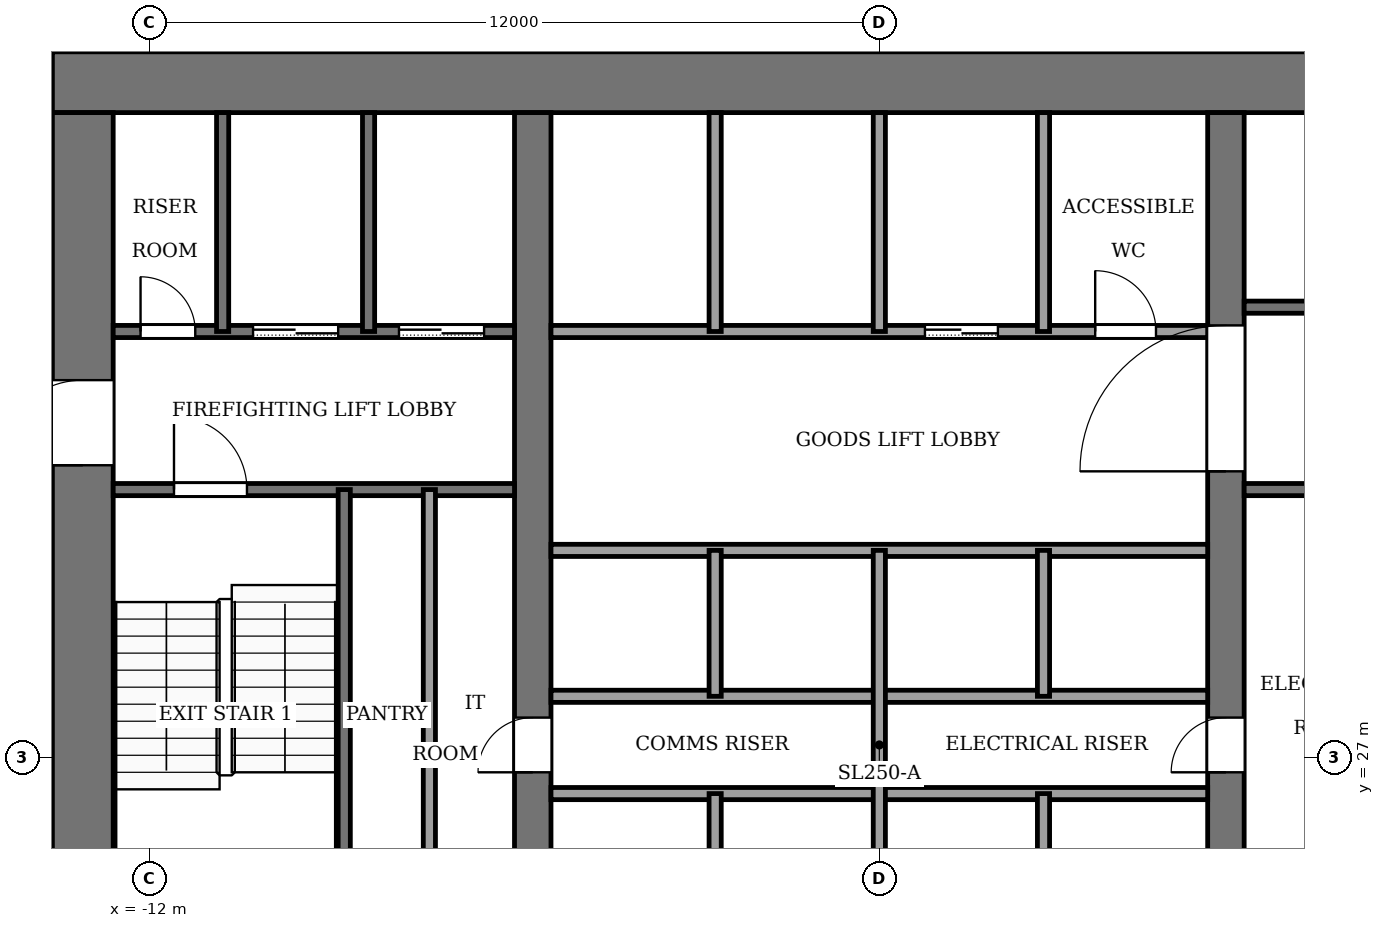
"""IFC4 building model, lengths in metres.
Left out: names, types, materials, properties, quantities, classifications, styles, units other than length and angle.
Written with IfcOpenShell. Run it as: python <this file> out.ifc"""

import sys

from ifc_helpers import new_model, si_unit, direction, frame, frame_2d, origin, place, context, subcontext, project, spatial, rectangle, extrude, element, fill, save


model = new_model("IFC4")
c1 = context("Model", 3, precision=1e-05, world=origin(), true_north=direction((0.0, 1.0)))
c2 = subcontext(c1, "Body", "Model", "MODEL_VIEW")
j1 = project(units=[si_unit("LENGTHUNIT", "METRE"), si_unit("PLANEANGLEUNIT", "RADIAN")], contexts=[c1])
p1 = place(None, origin())
s1 = spatial("IfcSite", under=j1, at=p1, CompositionType="ELEMENT")
p2 = place(p1, origin())
s2 = spatial("IfcBuilding", under=s1, at=p2, CompositionType="ELEMENT")
p3 = place(p2, frame((0.0, 0.0, 166.0)))
s3 = spatial("IfcBuildingStorey", under=s2, at=p3, CompositionType="ELEMENT", Elevation=166.0)
p4 = place(p3, frame((-13.6, 38.1, -0.13), z_axis=(0.0, 0.0, 1.0), x_axis=(1.0, 0.0, 0.0)))
e1 = element("IfcWall", 1, at=p4, inside=s3, PredefinedType="SHEAR", context=c2, shape_type="SweptSolid", body=[
    extrude(rectangle(XDim=27.2, YDim=1.0, at=frame_2d((13.6, 0.0))), origin(), (0.0, 0.0, 1.0), 3.88),
])
p5 = place(p3, frame((-13.1, 18.4, -0.13), z_axis=(0.0, 0.0, 1.0), x_axis=(0.0, 1.0, 0.0)))
e2 = element("IfcWall", 2, at=p5, inside=s3, PredefinedType="SHEAR", context=c2, shape_type="SweptSolid", body=[
    extrude(rectangle(XDim=19.2, YDim=1.0, at=frame_2d((9.6, 0.0))), origin(), (0.0, 0.0, 1.0), 3.88),
])
p6 = place(p5, frame((2.8, 0.0, 0.13)))
e3 = element("IfcOpeningElement", 3, at=p6, cuts=e2, PredefinedType="OPENING", context=c2, shape_type="SweptSolid", body=[
    extrude(rectangle(XDim=2.4, YDim=2.4, at=frame_2d((1.2, 1.2))), frame((0.0, 0.51, 0.0), z_axis=(0.0, -1.0, 0.0), x_axis=(1.0, 0.0, 0.0)), (0.0, 0.0, 1.0), 1.02),
])
p7 = place(p5, frame((13.4, 0.0, 0.13)))
e4 = element("IfcOpeningElement", 4, at=p7, cuts=e2, PredefinedType="OPENING", context=c2, shape_type="SweptSolid", body=[
    extrude(rectangle(XDim=1.4, YDim=2.2, at=frame_2d((0.7, 1.1))), frame((0.0, 0.51, 0.0), z_axis=(0.0, -1.0, 0.0), x_axis=(1.0, 0.0, 0.0)), (0.0, 0.0, 1.0), 1.02),
])
p8 = place(p3, frame((-5.7, 18.4, -0.13), z_axis=(0.0, 0.0, 1.0), x_axis=(0.0, 1.0, 0.0)))
e5 = element("IfcWall", 5, at=p8, inside=s3, PredefinedType="SHEAR", context=c2, shape_type="SweptSolid", body=[
    extrude(rectangle(XDim=19.2, YDim=0.6, at=frame_2d((9.6, 0.0))), origin(), (0.0, 0.0, 1.0), 3.88),
])
p9 = place(p8, frame((8.35, 0.0, 0.13)))
e6 = element("IfcOpeningElement", 6, at=p9, cuts=e5, PredefinedType="OPENING", context=c2, shape_type="SweptSolid", body=[
    extrude(rectangle(XDim=0.9, YDim=2.1, at=frame_2d((0.45, 1.05))), frame((0.0, 0.31, 0.0), z_axis=(0.0, -1.0, 0.0), x_axis=(1.0, 0.0, 0.0)), (0.0, 0.0, 1.0), 0.62),
])
p10 = place(p3, frame((5.7, 18.4, -0.13), z_axis=(0.0, 0.0, 1.0), x_axis=(0.0, 1.0, 0.0)))
e7 = element("IfcWall", 7, at=p10, inside=s3, PredefinedType="SHEAR", context=c2, shape_type="SweptSolid", body=[
    extrude(rectangle(XDim=19.2, YDim=0.6, at=frame_2d((9.6, 0.0))), origin(), (0.0, 0.0, 1.0), 3.88),
])
p11 = place(p10, frame((8.35, 0.0, 0.13)))
e8 = element("IfcOpeningElement", 8, at=p11, cuts=e7, PredefinedType="OPENING", context=c2, shape_type="SweptSolid", body=[
    extrude(rectangle(XDim=0.9, YDim=2.1, at=frame_2d((0.45, 1.05))), frame((0.0, 0.31, 0.0), z_axis=(0.0, -1.0, 0.0), x_axis=(1.0, 0.0, 0.0)), (0.0, 0.0, 1.0), 0.62),
])
p12 = place(p10, frame((13.3, 0.0, 0.13)))
e9 = element("IfcOpeningElement", 9, at=p12, cuts=e7, PredefinedType="OPENING", context=c2, shape_type="SweptSolid", body=[
    extrude(rectangle(XDim=2.4, YDim=2.4, at=frame_2d((1.2, 1.2))), frame((0.0, 0.31, 0.0), z_axis=(0.0, -1.0, 0.0), x_axis=(1.0, 0.0, 0.0)), (0.0, 0.0, 1.0), 0.62),
])
for number, where, z_axis, x_axis in (
    (10, (-5.4, 26.4, 0.0), (0.0, 0.0, 1.0), (1.0, 0.0, 0.0)),
    (11, (-5.4, 28.0, 0.0), (0.0, 0.0, 1.0), (1.0, 0.0, 0.0)),
    (12, (-5.4, 30.4, 0.0), (0.0, 0.0, 1.0), (1.0, 0.0, 0.0)),
):
    element("IfcWall", number, at=place(p3, frame(where, z_axis=z_axis, x_axis=x_axis)), inside=s3, PredefinedType="PARTITIONING", context=c2, shape_type="SweptSolid", body=[
        extrude(rectangle(XDim=10.8, YDim=0.2, at=frame_2d((5.4, 0.0))), origin(), (0.0, 0.0, 1.0), 3.75),
    ])
p13 = place(p3, frame((-12.6, 31.4, 0.0), z_axis=(0.0, 0.0, 1.0), x_axis=(1.0, 0.0, 0.0)))
e13 = element("IfcWall", 13, at=p13, inside=s3, PredefinedType="PARTITIONING", context=c2, shape_type="SweptSolid", body=[
    extrude(rectangle(XDim=6.6, YDim=0.2, at=frame_2d((3.3, 0.0))), origin(), (0.0, 0.0, 1.0), 3.75),
])
p14 = place(p13, frame((1.0, 0.0, 0.0)))
e14 = element("IfcOpeningElement", 14, at=p14, cuts=e13, PredefinedType="OPENING", context=c2, shape_type="SweptSolid", body=[
    extrude(rectangle(XDim=1.2, YDim=2.2, at=frame_2d((0.6, 1.1))), frame((0.0, 0.11, 0.0), z_axis=(0.0, -1.0, 0.0), x_axis=(1.0, 0.0, 0.0)), (0.0, 0.0, 1.0), 0.22),
])
p15 = place(p3, frame((6.0, 31.4, 0.0), z_axis=(0.0, 0.0, 1.0), x_axis=(1.0, 0.0, 0.0)))
e15 = element("IfcWall", 15, at=p15, inside=s3, PredefinedType="PARTITIONING", context=c2, shape_type="SweptSolid", body=[
    extrude(rectangle(XDim=6.6, YDim=0.2, at=frame_2d((3.3, 0.0))), origin(), (0.0, 0.0, 1.0), 3.75),
])
p16 = place(p3, frame((-12.6, 34.0, 0.0), z_axis=(0.0, 0.0, 1.0), x_axis=(1.0, 0.0, 0.0)))
e16 = element("IfcWall", 16, at=p16, inside=s3, PredefinedType="PARTITIONING", context=c2, shape_type="SweptSolid", body=[
    extrude(rectangle(XDim=6.6, YDim=0.2, at=frame_2d((3.3, 0.0))), origin(), (0.0, 0.0, 1.0), 3.75),
])
p17 = place(p16, frame((4.7, 0.0, 0.0)))
e17 = element("IfcOpeningElement", 17, at=p17, cuts=e16, PredefinedType="OPENING", context=c2, shape_type="SweptSolid", body=[
    extrude(rectangle(XDim=1.4, YDim=2.2, at=frame_2d((0.7, 1.1))), frame((0.0, 0.11, 0.0), z_axis=(0.0, -1.0, 0.0), x_axis=(1.0, 0.0, 0.0)), (0.0, 0.0, 1.0), 0.22),
])
p18 = place(p16, frame((2.3, 0.0, 0.0)))
e18 = element("IfcOpeningElement", 18, at=p18, cuts=e16, PredefinedType="OPENING", context=c2, shape_type="SweptSolid", body=[
    extrude(rectangle(XDim=1.4, YDim=2.2, at=frame_2d((0.7, 1.1))), frame((0.0, 0.11, 0.0), z_axis=(0.0, -1.0, 0.0), x_axis=(1.0, 0.0, 0.0)), (0.0, 0.0, 1.0), 0.22),
])
p19 = place(p16, frame((0.45, 0.0, 0.0)))
e19 = element("IfcOpeningElement", 19, at=p19, cuts=e16, PredefinedType="OPENING", context=c2, shape_type="SweptSolid", body=[
    extrude(rectangle(XDim=0.9, YDim=2.1, at=frame_2d((0.45, 1.05))), frame((0.0, 0.11, 0.0), z_axis=(0.0, -1.0, 0.0), x_axis=(1.0, 0.0, 0.0)), (0.0, 0.0, 1.0), 0.22),
])
p20 = place(p3, frame((-5.4, 34.0, 0.0), z_axis=(0.0, 0.0, 1.0), x_axis=(1.0, 0.0, 0.0)))
e20 = element("IfcWall", 20, at=p20, inside=s3, PredefinedType="PARTITIONING", context=c2, shape_type="SweptSolid", body=[
    extrude(rectangle(XDim=10.8, YDim=0.2, at=frame_2d((5.4, 0.0))), origin(), (0.0, 0.0, 1.0), 3.75),
])
p21 = place(p20, frame((6.15, 0.0, 0.0)))
e21 = element("IfcOpeningElement", 21, at=p21, cuts=e20, PredefinedType="OPENING", context=c2, shape_type="SweptSolid", body=[
    extrude(rectangle(XDim=1.2, YDim=2.2, at=frame_2d((0.6, 1.1))), frame((0.0, 0.11, 0.0), z_axis=(0.0, -1.0, 0.0), x_axis=(1.0, 0.0, 0.0)), (0.0, 0.0, 1.0), 0.22),
])
p22 = place(p20, frame((8.95, 0.0, 0.0)))
e22 = element("IfcOpeningElement", 22, at=p22, cuts=e20, PredefinedType="OPENING", context=c2, shape_type="SweptSolid", body=[
    extrude(rectangle(XDim=1.0, YDim=2.1, at=frame_2d((0.5, 1.05))), frame((0.0, 0.11, 0.0), z_axis=(0.0, -1.0, 0.0), x_axis=(1.0, 0.0, 0.0)), (0.0, 0.0, 1.0), 0.22),
])
p23 = place(p3, frame((6.0, 34.4, 0.0), z_axis=(0.0, 0.0, 1.0), x_axis=(1.0, 0.0, 0.0)))
e23 = element("IfcWall", 23, at=p23, inside=s3, PredefinedType="PARTITIONING", context=c2, shape_type="SweptSolid", body=[
    extrude(rectangle(XDim=6.6, YDim=0.2, at=frame_2d((3.3, 0.0))), origin(), (0.0, 0.0, 1.0), 3.75),
])
p24 = place(p23, frame((4.8, 0.0, 0.0)))
e24 = element("IfcOpeningElement", 24, at=p24, cuts=e23, PredefinedType="OPENING", context=c2, shape_type="SweptSolid", body=[
    extrude(rectangle(XDim=1.2, YDim=2.2, at=frame_2d((0.6, 1.1))), frame((0.0, 0.11, 0.0), z_axis=(0.0, -1.0, 0.0), x_axis=(1.0, 0.0, 0.0)), (0.0, 0.0, 1.0), 0.22),
])
p25 = place(p3, frame((-10.8, 34.0, 0.0), z_axis=(0.0, 0.0, 1.0), x_axis=(0.0, 1.0, 0.0)))
e25 = element("IfcWall", 25, at=p25, inside=s3, PredefinedType="PARTITIONING", context=c2, shape_type="SweptSolid", body=[
    extrude(rectangle(XDim=3.6, YDim=0.2, at=frame_2d((1.8, 0.0))), origin(), (0.0, 0.0, 1.0), 3.75),
])
p26 = place(p3, frame((-8.8, 24.0, 0.0), z_axis=(0.0, 0.0, 1.0), x_axis=(0.0, 1.0, 0.0)))
e26 = element("IfcWall", 26, at=p26, inside=s3, PredefinedType="PARTITIONING", context=c2, shape_type="SweptSolid", body=[
    extrude(rectangle(XDim=7.4, YDim=0.2, at=frame_2d((3.7, 0.0))), origin(), (0.0, 0.0, 1.0), 3.75),
])
p27 = place(p3, frame((-8.4, 34.0, 0.0), z_axis=(0.0, 0.0, 1.0), x_axis=(0.0, 1.0, 0.0)))
e27 = element("IfcWall", 27, at=p27, inside=s3, PredefinedType="PARTITIONING", context=c2, shape_type="SweptSolid", body=[
    extrude(rectangle(XDim=3.6, YDim=0.2, at=frame_2d((1.8, 0.0))), origin(), (0.0, 0.0, 1.0), 3.75),
])
p28 = place(p3, frame((-7.4, 24.0, 0.0), z_axis=(0.0, 0.0, 1.0), x_axis=(0.0, 1.0, 0.0)))
e28 = element("IfcWall", 28, at=p28, inside=s3, PredefinedType="PARTITIONING", context=c2, shape_type="SweptSolid", body=[
    extrude(rectangle(XDim=7.4, YDim=0.2, at=frame_2d((3.7, 0.0))), origin(), (0.0, 0.0, 1.0), 3.75),
])
for number, where, z_axis, x_axis in (
    (29, (-2.7, 24.0, 0.0), (0.0, 0.0, 1.0), (0.0, 1.0, 0.0)),
    (30, (-2.7, 28.0, 0.0), (0.0, 0.0, 1.0), (0.0, 1.0, 0.0)),
):
    element("IfcWall", number, at=place(p3, frame(where, z_axis=z_axis, x_axis=x_axis)), inside=s3, PredefinedType="PARTITIONING", context=c2, shape_type="SweptSolid", body=[
        extrude(rectangle(XDim=2.4, YDim=0.2, at=frame_2d((1.2, 0.0))), origin(), (0.0, 0.0, 1.0), 3.75),
    ])
p29 = place(p3, frame((-2.7, 34.0, 0.0), z_axis=(0.0, 0.0, 1.0), x_axis=(0.0, 1.0, 0.0)))
e31 = element("IfcWall", 31, at=p29, inside=s3, PredefinedType="PARTITIONING", context=c2, shape_type="SweptSolid", body=[
    extrude(rectangle(XDim=3.6, YDim=0.2, at=frame_2d((1.8, 0.0))), origin(), (0.0, 0.0, 1.0), 3.75),
])
p30 = place(p3, frame((0.0, 24.0, 0.0), z_axis=(0.0, 0.0, 1.0), x_axis=(0.0, 1.0, 0.0)))
e32 = element("IfcWall", 32, at=p30, inside=s3, PredefinedType="PARTITIONING", context=c2, shape_type="SweptSolid", body=[
    extrude(rectangle(XDim=6.4, YDim=0.2, at=frame_2d((3.2, 0.0))), origin(), (0.0, 0.0, 1.0), 3.75),
])
p31 = place(p3, frame((0.0, 34.0, 0.0), z_axis=(0.0, 0.0, 1.0), x_axis=(0.0, 1.0, 0.0)))
e33 = element("IfcWall", 33, at=p31, inside=s3, PredefinedType="PARTITIONING", context=c2, shape_type="SweptSolid", body=[
    extrude(rectangle(XDim=3.6, YDim=0.2, at=frame_2d((1.8, 0.0))), origin(), (0.0, 0.0, 1.0), 3.75),
])
for number, where, z_axis, x_axis in (
    (34, (2.7, 24.0, 0.0), (0.0, 0.0, 1.0), (0.0, 1.0, 0.0)),
    (35, (2.7, 28.0, 0.0), (0.0, 0.0, 1.0), (0.0, 1.0, 0.0)),
):
    element("IfcWall", number, at=place(p3, frame(where, z_axis=z_axis, x_axis=x_axis)), inside=s3, PredefinedType="PARTITIONING", context=c2, shape_type="SweptSolid", body=[
        extrude(rectangle(XDim=2.4, YDim=0.2, at=frame_2d((1.2, 0.0))), origin(), (0.0, 0.0, 1.0), 3.75),
    ])
p32 = place(p3, frame((2.7, 34.0, 0.0), z_axis=(0.0, 0.0, 1.0), x_axis=(0.0, 1.0, 0.0)))
e36 = element("IfcWall", 36, at=p32, inside=s3, PredefinedType="PARTITIONING", context=c2, shape_type="SweptSolid", body=[
    extrude(rectangle(XDim=3.6, YDim=0.2, at=frame_2d((1.8, 0.0))), origin(), (0.0, 0.0, 1.0), 3.75),
])
p33 = place(p21, origin())
e37 = element("IfcDoor", 37, at=p33, inside=s3, OperationType="SLIDING_TO_LEFT", PredefinedType="DOOR", context=c2, shape_type="SweptSolid", body=[
    extrude(rectangle(XDim=1.2, YDim=2.2, at=frame_2d((0.6, 1.1))), frame((0.0, 0.025, 0.0), z_axis=(0.0, -1.0, 0.0), x_axis=(1.0, 0.0, 0.0)), (0.0, 0.0, 1.0), 0.05),
])
fill(e21, e37)
p34 = place(p17, origin())
e38 = element("IfcDoor", 38, at=p34, inside=s3, OperationType="SLIDING_TO_LEFT", PredefinedType="DOOR", context=c2, shape_type="SweptSolid", body=[
    extrude(rectangle(XDim=1.4, YDim=2.2, at=frame_2d((0.7, 1.1))), frame((0.0, 0.025, 0.0), z_axis=(0.0, -1.0, 0.0), x_axis=(1.0, 0.0, 0.0)), (0.0, 0.0, 1.0), 0.05),
])
fill(e17, e38)
p35 = place(p18, origin())
e39 = element("IfcDoor", 39, at=p35, inside=s3, OperationType="SLIDING_TO_LEFT", PredefinedType="DOOR", context=c2, shape_type="SweptSolid", body=[
    extrude(rectangle(XDim=1.4, YDim=2.2, at=frame_2d((0.7, 1.1))), frame((0.0, 0.025, 0.0), z_axis=(0.0, -1.0, 0.0), x_axis=(1.0, 0.0, 0.0)), (0.0, 0.0, 1.0), 0.05),
])
fill(e18, e39)
p36 = place(p19, origin())
e40 = element("IfcDoor", 40, at=p36, inside=s3, OperationType="SINGLE_SWING_RIGHT", PredefinedType="DOOR", context=c2, shape_type="SweptSolid", body=[
    extrude(rectangle(XDim=0.9, YDim=2.1, at=frame_2d((0.45, 1.05))), frame((0.0, 0.025, 0.0), z_axis=(0.0, -1.0, 0.0), x_axis=(1.0, 0.0, 0.0)), (0.0, 0.0, 1.0), 0.05),
])
fill(e19, e40)
p37 = place(p22, origin())
e41 = element("IfcDoor", 41, at=p37, inside=s3, OperationType="SINGLE_SWING_LEFT", PredefinedType="DOOR", context=c2, shape_type="SweptSolid", body=[
    extrude(rectangle(XDim=1.0, YDim=2.1, at=frame_2d((0.5, 1.05))), frame((0.0, 0.025, 0.0), z_axis=(0.0, -1.0, 0.0), x_axis=(1.0, 0.0, 0.0)), (0.0, 0.0, 1.0), 0.05),
])
fill(e22, e41)
p38 = place(p9, origin())
e42 = element("IfcDoor", 42, at=p38, inside=s3, OperationType="SINGLE_SWING_LEFT", PredefinedType="DOOR", context=c2, shape_type="SweptSolid", body=[
    extrude(rectangle(XDim=0.9, YDim=2.1, at=frame_2d((0.45, 1.05))), frame((0.0, 0.025, 0.0), z_axis=(0.0, -1.0, 0.0), x_axis=(1.0, 0.0, 0.0)), (0.0, 0.0, 1.0), 0.05),
])
fill(e6, e42)
p39 = place(p11, origin())
e43 = element("IfcDoor", 43, at=p39, inside=s3, OperationType="SINGLE_SWING_RIGHT", PredefinedType="DOOR", context=c2, shape_type="SweptSolid", body=[
    extrude(rectangle(XDim=0.9, YDim=2.1, at=frame_2d((0.45, 1.05))), frame((0.0, 0.025, 0.0), z_axis=(0.0, -1.0, 0.0), x_axis=(1.0, 0.0, 0.0)), (0.0, 0.0, 1.0), 0.05),
])
fill(e8, e43)
p40 = place(p14, origin())
e44 = element("IfcDoor", 44, at=p40, inside=s3, OperationType="SINGLE_SWING_RIGHT", PredefinedType="DOOR", context=c2, shape_type="SweptSolid", body=[
    extrude(rectangle(XDim=1.2, YDim=2.2, at=frame_2d((0.6, 1.1))), frame((0.0, 0.025, 0.0), z_axis=(0.0, -1.0, 0.0), x_axis=(1.0, 0.0, 0.0)), (0.0, 0.0, 1.0), 0.05),
])
fill(e14, e44)
p41 = place(p12, origin())
e45 = element("IfcDoor", 45, at=p41, inside=s3, OperationType="DOUBLE_DOOR_SINGLE_SWING", PredefinedType="DOOR", context=c2, shape_type="SweptSolid", body=[
    extrude(rectangle(XDim=2.4, YDim=2.4, at=frame_2d((1.2, 1.2))), frame((0.0, 0.025, 0.0), z_axis=(0.0, -1.0, 0.0), x_axis=(1.0, 0.0, 0.0)), (0.0, 0.0, 1.0), 0.05),
])
fill(e9, e45)
p42 = place(p7, origin())
e46 = element("IfcDoor", 46, at=p42, inside=s3, OperationType="SINGLE_SWING_RIGHT", PredefinedType="DOOR", context=c2, shape_type="SweptSolid", body=[
    extrude(rectangle(XDim=1.4, YDim=2.2, at=frame_2d((0.7, 1.1))), frame((0.0, 0.025, 0.0), z_axis=(0.0, -1.0, 0.0), x_axis=(1.0, 0.0, 0.0)), (0.0, 0.0, 1.0), 0.05),
])
fill(e4, e46)
save(model, sys.argv[1])
